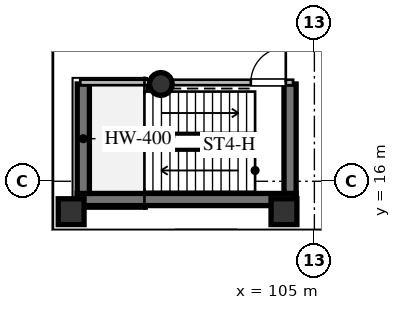
"""IFC4 building model, lengths in metres.
Left out: names, types, materials, properties, quantities, classifications, styles, units other than length and angle.
Written with IfcOpenShell. Run it as: python <this file> out.ifc"""

import sys

from ifc_helpers import new_model, si_unit, direction, frame, frame_2d, origin, origin_2d, place, context, subcontext, project, spatial, rectangle, circle, extrude, element, fill, save


model = new_model("IFC4")
c1 = context("Model", 3, precision=1e-05, world=origin(), true_north=direction((0.0, 1.0)))
c2 = subcontext(c1, "Body", "Model", "MODEL_VIEW")
j1 = project(units=[si_unit("LENGTHUNIT", "METRE"), si_unit("PLANEANGLEUNIT", "RADIAN")], contexts=[c1])
p1 = place(None, origin())
s1 = spatial("IfcSite", under=j1, at=p1, CompositionType="ELEMENT")
p2 = place(p1, origin())
s2 = spatial("IfcBuilding", under=s1, at=p2, CompositionType="ELEMENT")
p3 = place(p2, origin())
s3 = spatial("IfcBuildingStorey", under=s2, at=p3, CompositionType="ELEMENT", Elevation=0.0)
for number, where, z_axis, x_axis in (
    (1, (97.0, 15.0, 0.0), (0.0, 0.0, 1.0), (1.0, 0.0, 0.0)),
    (2, (104.0, 15.0, 0.0), (0.0, 0.0, 1.0), (1.0, 0.0, 0.0)),
):
    element("IfcColumn", number, at=place(p3, frame(where, z_axis=z_axis, x_axis=x_axis)), inside=s3, PredefinedType="COLUMN", context=c2, shape_type="SweptSolid", body=[
        extrude(rectangle(XDim=0.85, YDim=0.85, at=origin_2d()), origin(), (0.0, 0.0, 1.0), 4.8),
    ])
p4 = place(p3, frame((97.2, 15.4, 0.0), z_axis=(0.0, 0.0, 1.0), x_axis=(1.0, 0.0, 0.0)))
e3 = element("IfcWall", 3, at=p4, inside=s3, PredefinedType="SHEAR", context=c2, shape_type="SweptSolid", body=[
    extrude(rectangle(XDim=7.2, YDim=0.4, at=frame_2d((3.6, 0.0))), origin(), (0.0, 0.0, 1.0), 4.52),
])
for number, where, z_axis, x_axis in (
    (4, (97.4, 15.6, 0.0), (0.0, 0.0, 1.0), (0.0, 1.0, 0.0)),
    (5, (104.2, 15.6, 0.0), (0.0, 0.0, 1.0), (0.0, 1.0, 0.0)),
):
    element("IfcWall", number, at=place(p3, frame(where, z_axis=z_axis, x_axis=x_axis)), inside=s3, PredefinedType="SHEAR", context=c2, shape_type="SweptSolid", body=[
        extrude(rectangle(XDim=3.6, YDim=0.4, at=frame_2d((1.8, 0.0))), origin(), (0.0, 0.0, 1.0), 4.52),
    ])
p5 = place(p3, frame((99.95, 19.2, 0.0), z_axis=(0.0, 0.0, 1.0), x_axis=(1.0, 0.0, 0.0)))
e6 = element("IfcColumn", 6, at=p5, inside=s3, PredefinedType="COLUMN", context=c2, shape_type="SweptSolid", body=[
    extrude(circle(Radius=0.375, at=origin_2d()), origin(), (0.0, 0.0, 1.0), 4.8),
])
p6 = place(p3, frame((108.0, 14.2, 0.0), z_axis=(0.0, 0.0, 1.0), x_axis=(-1.0, 0.0, 0.0)))
e7 = element("IfcWall", 7, at=p6, inside=s3, PredefinedType="STANDARD", context=c2, shape_type="SweptSolid", body=[
    extrude(rectangle(XDim=11.8, YDim=0.4, at=frame_2d((5.9, 0.0))), origin(), (0.0, 0.0, 1.0), 4.52),
])
p7 = place(p6, frame((5.56, 0.0, 0.0)))
e8 = element("IfcOpeningElement", 8, at=p7, cuts=e7, PredefinedType="OPENING", context=c2, shape_type="SweptSolid", body=[
    extrude(rectangle(XDim=2.0, YDim=2.2, at=frame_2d((1.0, 1.1))), frame((0.0, 0.21, 0.0), z_axis=(0.0, -1.0, 0.0), x_axis=(1.0, 0.0, 0.0)), (0.0, 0.0, 1.0), 0.42),
])
p8 = place(p3, frame((96.2, 28.0, 0.0), z_axis=(0.0, 0.0, 1.0), x_axis=(0.0, -1.0, 0.0)))
e9 = element("IfcWall", 9, at=p8, inside=s3, PredefinedType="STANDARD", context=c2, shape_type="SweptSolid", body=[
    extrude(rectangle(XDim=13.8, YDim=0.4, at=frame_2d((6.9, 0.0))), origin(), (0.0, 0.0, 1.0), 4.52),
])
p9 = place(p3, frame((97.3, 19.25, 0.0), z_axis=(0.0, 0.0, 1.0), x_axis=(1.0, 0.0, 0.0)))
e10 = element("IfcWall", 10, at=p9, inside=s3, PredefinedType="PARTITIONING", context=c2, shape_type="SweptSolid", body=[
    extrude(rectangle(XDim=7.0, YDim=0.18, at=frame_2d((3.5, 0.0))), origin(), (0.0, 0.0, 1.0), 4.52),
])
p10 = place(p9, frame((5.61, 0.0, 0.0)))
e11 = element("IfcOpeningElement", 11, at=p10, cuts=e10, PredefinedType="OPENING", context=c2, shape_type="SweptSolid", body=[
    extrude(rectangle(XDim=1.15, YDim=2.1, at=frame_2d((0.575, 1.05))), frame((0.0, 0.1, 0.0), z_axis=(0.0, -1.0, 0.0), x_axis=(1.0, 0.0, 0.0)), (0.0, 0.0, 1.0), 0.2),
])
p11 = place(p10, origin())
e12 = element("IfcDoor", 12, at=p11, inside=s3, OperationType="SINGLE_SWING_RIGHT", PredefinedType="DOOR", context=c2, shape_type="SweptSolid", body=[
    extrude(rectangle(XDim=1.15, YDim=2.1, at=frame_2d((0.575, 1.05))), frame((0.0, 0.025, 0.0), z_axis=(0.0, -1.0, 0.0), x_axis=(1.0, 0.0, 0.0)), (0.0, 0.0, 1.0), 0.05),
])
fill(e11, e12)
save(model, sys.argv[1])
